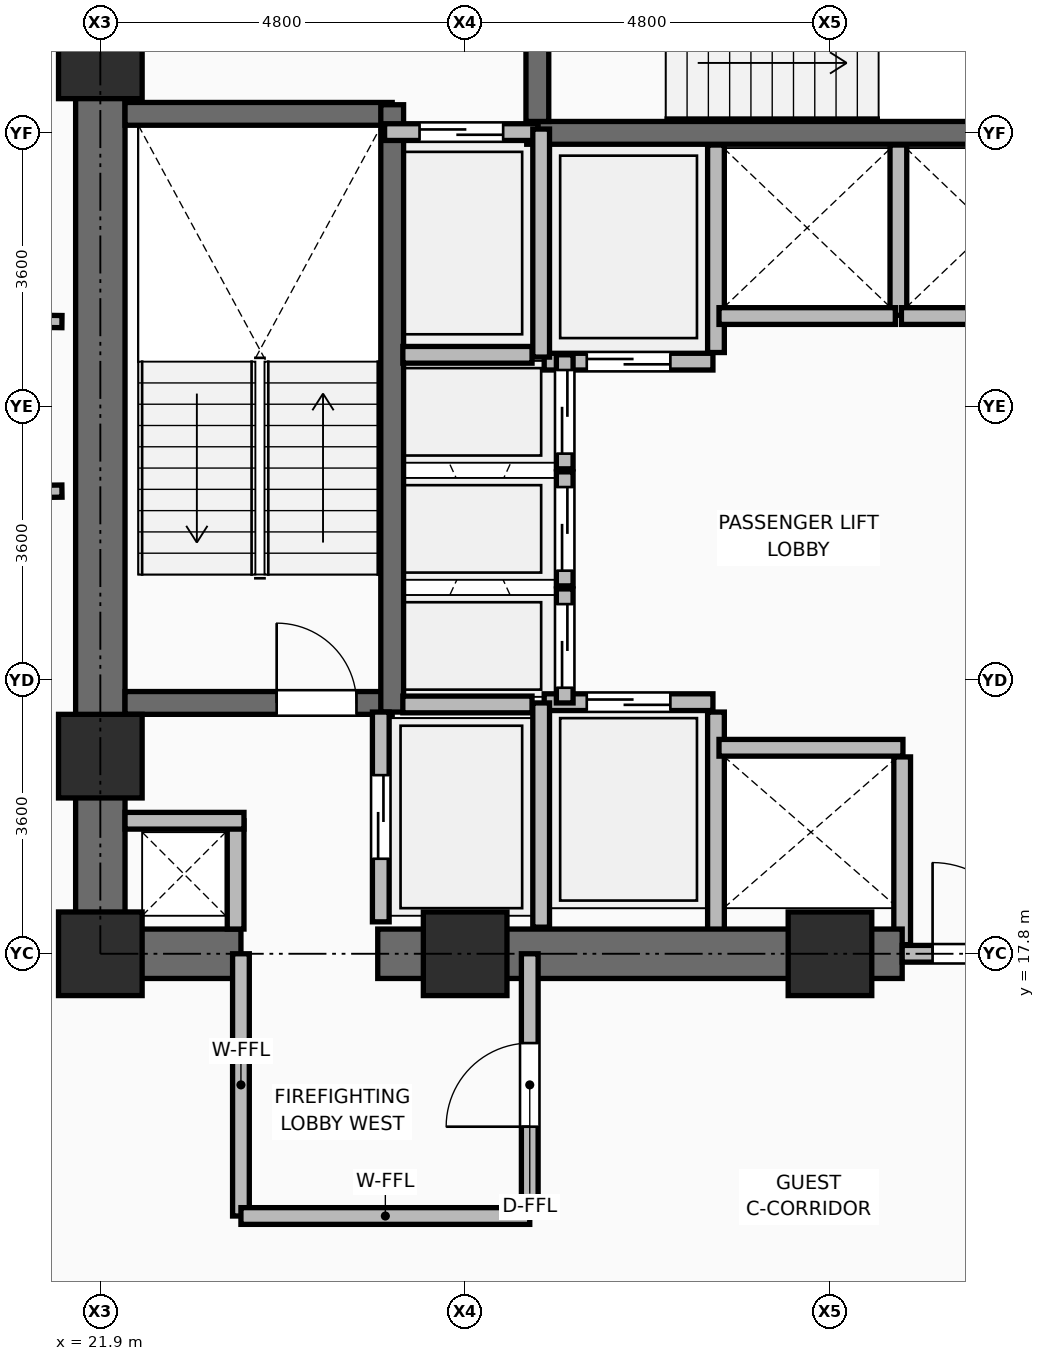
"""IFC4 building model, lengths in metres.
Left out: names, types, materials, properties, quantities, classifications, styles, units other than length and angle.
Written with IfcOpenShell. Run it as: python <this file> out.ifc"""

import sys

from ifc_helpers import new_model, si_unit, direction, frame, frame_2d, origin, origin_2d, place, context, subcontext, project, spatial, rectangle, extrude, element, fill, save


model = new_model("IFC4")
c1 = context("Model", 3, precision=1e-05, world=origin(), true_north=direction((0.0, 1.0)))
c2 = subcontext(c1, "Body", "Model", "MODEL_VIEW")
j1 = project(units=[si_unit("LENGTHUNIT", "METRE"), si_unit("PLANEANGLEUNIT", "RADIAN")], contexts=[c1])
p1 = place(None, origin())
s1 = spatial("IfcSite", under=j1, at=p1, CompositionType="ELEMENT")
p2 = place(p1, origin())
s2 = spatial("IfcBuilding", under=s1, at=p2, CompositionType="ELEMENT")
p3 = place(p2, frame((0.0, 0.0, 75.75)))
s3 = spatial("IfcBuildingStorey", under=s2, at=p3, CompositionType="ELEMENT", Elevation=75.75)
for number, where, z_axis, x_axis in (
    (1, (21.9, 17.8, 0.0), (0.0, 0.0, 1.0), (1.0, 0.0, 0.0)),
    (2, (26.7, 17.8, 0.0), (0.0, 0.0, 1.0), (1.0, 0.0, 0.0)),
    (3, (31.5, 17.8, 0.0), (0.0, 0.0, 1.0), (1.0, 0.0, 0.0)),
    (4, (21.9, 20.4, 0.0), (0.0, 0.0, 1.0), (1.0, 0.0, 0.0)),
    (5, (21.9, 29.6, 0.0), (0.0, 0.0, 1.0), (1.0, 0.0, 0.0)),
):
    element("IfcColumn", number, at=place(p3, frame(where, z_axis=z_axis, x_axis=x_axis)), inside=s3, PredefinedType="COLUMN", context=c2, shape_type="SweptSolid", body=[
        extrude(rectangle(XDim=1.1, YDim=1.1, at=origin_2d()), origin(), (0.0, 0.0, 1.0), 3.75),
    ])
p4 = place(p3, frame((30.0, 18.08, 0.0), z_axis=(0.0, 0.0, 1.0), x_axis=(0.0, 1.0, 0.0)))
e6 = element("IfcWall", 6, at=p4, inside=s3, PredefinedType="PARTITIONING", context=c2, shape_type="SweptSolid", body=[
    extrude(rectangle(XDim=2.9, YDim=0.22, at=frame_2d((1.45, 0.0))), origin(), (0.0, 0.0, 1.0), 3.545),
])
p5 = place(p3, frame((32.45, 17.92, 0.0), z_axis=(0.0, 0.0, 1.0), x_axis=(0.0, 1.0, 0.0)))
e7 = element("IfcWall", 7, at=p5, inside=s3, PredefinedType="PARTITIONING", context=c2, shape_type="SweptSolid", body=[
    extrude(rectangle(XDim=2.47, YDim=0.22, at=frame_2d((1.235, 0.0))), origin(), (0.0, 0.0, 1.0), 2.928),
])
p6 = place(p3, frame((30.0, 25.71, 0.0), z_axis=(0.0, 0.0, 1.0), x_axis=(0.0, 1.0, 0.0)))
e8 = element("IfcWall", 8, at=p6, inside=s3, PredefinedType="PARTITIONING", context=c2, shape_type="SweptSolid", body=[
    extrude(rectangle(XDim=2.73, YDim=0.22, at=frame_2d((1.365, 0.0))), origin(), (0.0, 0.0, 1.0), 3.545),
])
p7 = place(p3, frame((32.4, 26.2, 0.0), z_axis=(0.0, 0.0, 1.0), x_axis=(0.0, 1.0, 0.0)))
e9 = element("IfcWall", 9, at=p7, inside=s3, PredefinedType="PARTITIONING", context=c2, shape_type="SweptSolid", body=[
    extrude(rectangle(XDim=2.24, YDim=0.22, at=frame_2d((1.12, 0.0))), origin(), (0.0, 0.0, 1.0), 3.545),
])
p8 = place(p3, frame((21.575, 17.8, 0.0), z_axis=(0.0, 0.0, 1.0), x_axis=(1.0, 0.0, 0.0)))
e10 = element("IfcWall", 10, at=p8, inside=s3, PredefinedType="SHEAR", context=c2, shape_type="SweptSolid", body=[
    extrude(rectangle(XDim=2.175, YDim=0.65, at=frame_2d((1.087, 0.0))), origin(), (0.0, 0.0, 1.0), 3.57),
])
p9 = place(p3, frame((25.55, 17.8, 0.0), z_axis=(0.0, 0.0, 1.0), x_axis=(1.0, 0.0, 0.0)))
e11 = element("IfcWall", 11, at=p9, inside=s3, PredefinedType="SHEAR", context=c2, shape_type="SweptSolid", body=[
    extrude(rectangle(XDim=6.9, YDim=0.65, at=frame_2d((3.45, 0.0))), origin(), (0.0, 0.0, 1.0), 3.57),
])
p10 = place(p3, frame((32.45, 17.8, 0.0), z_axis=(0.0, 0.0, 1.0), x_axis=(1.0, 0.0, 0.0)))
e12 = element("IfcWall", 12, at=p10, inside=s3, PredefinedType="PARTITIONING", context=c2, shape_type="SweptSolid", body=[
    extrude(rectangle(XDim=2.5, YDim=0.22, at=frame_2d((1.25, 0.0))), origin(), (0.0, 0.0, 1.0), 2.928),
])
p11 = place(p10, frame((0.4, 0.0, 0.0)))
e13 = element("IfcOpeningElement", 13, at=p11, cuts=e12, PredefinedType="OPENING", context=c2, shape_type="SweptSolid", body=[
    extrude(rectangle(XDim=1.2, YDim=2.1, at=frame_2d((0.6, 1.05))), frame((0.0, 0.12, 0.0), z_axis=(0.0, -1.0, 0.0), x_axis=(1.0, 0.0, 0.0)), (0.0, 0.0, 1.0), 0.24),
])
p12 = place(p3, frame((21.9, 18.125, 0.0), z_axis=(0.0, 0.0, 1.0), x_axis=(0.0, 1.0, 0.0)))
e14 = element("IfcWall", 14, at=p12, inside=s3, PredefinedType="SHEAR", context=c2, shape_type="SweptSolid", body=[
    extrude(rectangle(XDim=14.0, YDim=0.65, at=frame_2d((7.0, 0.0))), origin(), (0.0, 0.0, 1.0), 3.57),
])
p13 = place(p3, frame((22.225, 21.1, 0.0), z_axis=(0.0, 0.0, 1.0), x_axis=(1.0, 0.0, 0.0)))
e15 = element("IfcWall", 15, at=p13, inside=s3, PredefinedType="SHEAR", context=c2, shape_type="SweptSolid", body=[
    extrude(rectangle(XDim=3.515, YDim=0.3, at=frame_2d((1.757, 0.0))), origin(), (0.0, 0.0, 1.0), 3.57),
])
p14 = place(p13, frame((1.995, 0.0, 0.0)))
e16 = element("IfcOpeningElement", 16, at=p14, cuts=e15, PredefinedType="OPENING", context=c2, shape_type="SweptSolid", body=[
    extrude(rectangle(XDim=1.05, YDim=2.1, at=frame_2d((0.525, 1.05))), frame((0.0, 0.16, 0.0), z_axis=(0.0, -1.0, 0.0), x_axis=(1.0, 0.0, 0.0)), (0.0, 0.0, 1.0), 0.32),
])
p15 = place(p3, frame((22.225, 28.85, 0.0), z_axis=(0.0, 0.0, 1.0), x_axis=(1.0, 0.0, 0.0)))
e17 = element("IfcWall", 17, at=p15, inside=s3, PredefinedType="SHEAR", context=c2, shape_type="SweptSolid", body=[
    extrude(rectangle(XDim=3.515, YDim=0.3, at=frame_2d((1.757, 0.0))), origin(), (0.0, 0.0, 1.0), 3.57),
])
p16 = place(p3, frame((25.74, 20.98, 0.0), z_axis=(0.0, 0.0, 1.0), x_axis=(0.0, 1.0, 0.0)))
e18 = element("IfcWall", 18, at=p16, inside=s3, PredefinedType="SHEAR", context=c2, shape_type="SweptSolid", body=[
    extrude(rectangle(XDim=7.99, YDim=0.3, at=frame_2d((3.995, 0.0))), origin(), (0.0, 0.0, 1.0), 3.57),
])
p17 = place(p3, frame((27.51, 28.6, 0.0), z_axis=(0.0, 0.0, 1.0), x_axis=(1.0, 0.0, 0.0)))
e19 = element("IfcWall", 19, at=p17, inside=s3, PredefinedType="SHEAR", context=c2, shape_type="SweptSolid", body=[
    extrude(rectangle(XDim=8.03, YDim=0.3, at=frame_2d((4.015, 0.0))), origin(), (0.0, 0.0, 1.0), 3.57),
])
p18 = place(p3, frame((27.65, 28.75, 0.0), z_axis=(0.0, 0.0, 1.0), x_axis=(0.0, 1.0, 0.0)))
e20 = element("IfcWall", 20, at=p18, inside=s3, PredefinedType="SHEAR", context=c2, shape_type="SweptSolid", body=[
    extrude(rectangle(XDim=3.375, YDim=0.3, at=frame_2d((1.688, 0.0))), origin(), (0.0, 0.0, 1.0), 3.57),
])
p19 = place(p18, frame((1.0, 0.0, 0.0)))
e21 = element("IfcOpeningElement", 21, at=p19, cuts=e20, PredefinedType="OPENING", context=c2, shape_type="SweptSolid", body=[
    extrude(rectangle(XDim=1.05, YDim=2.1, at=frame_2d((0.525, 1.05))), frame((0.0, 0.16, 0.0), z_axis=(0.0, -1.0, 0.0), x_axis=(1.0, 0.0, 0.0)), (0.0, 0.0, 1.0), 0.32),
])
p20 = place(p3, frame((23.68, 18.125, 0.0), z_axis=(0.0, 0.0, 1.0), x_axis=(0.0, 1.0, 0.0)))
e22 = element("IfcWall", 22, at=p20, inside=s3, PredefinedType="PARTITIONING", context=c2, shape_type="SweptSolid", body=[
    extrude(rectangle(XDim=1.425, YDim=0.22, at=frame_2d((0.712, 0.0))), origin(), (0.0, 0.0, 1.0), 3.55),
])
p21 = place(p3, frame((22.225, 19.55, 0.0), z_axis=(0.0, 0.0, 1.0), x_axis=(1.0, 0.0, 0.0)))
e23 = element("IfcWall", 23, at=p21, inside=s3, PredefinedType="PARTITIONING", context=c2, shape_type="SweptSolid", body=[
    extrude(rectangle(XDim=1.565, YDim=0.22, at=frame_2d((0.782, 0.0))), origin(), (0.0, 0.0, 1.0), 2.595),
])
p22 = place(p3, frame((25.59, 18.22, 0.0), z_axis=(0.0, 0.0, 1.0), x_axis=(0.0, 1.0, 0.0)))
e24 = element("IfcWall", 24, at=p22, inside=s3, PredefinedType="PARTITIONING", context=c2, shape_type="SweptSolid", body=[
    extrude(rectangle(XDim=2.76, YDim=0.22, at=frame_2d((1.38, 0.0))), origin(), (0.0, 0.0, 1.0), 3.55),
])
p23 = place(p22, frame((0.83, 0.0, 0.0)))
e25 = element("IfcOpeningElement", 25, at=p23, cuts=e24, PredefinedType="OPENING", context=c2, shape_type="SweptSolid", body=[
    extrude(rectangle(XDim=1.1, YDim=2.2, at=frame_2d((0.55, 1.1))), frame((0.0, 0.12, 0.0), z_axis=(0.0, -1.0, 0.0), x_axis=(1.0, 0.0, 0.0)), (0.0, 0.0, 1.0), 0.24),
])
p24 = place(p3, frame((25.64, 28.61, 0.0), z_axis=(0.0, 0.0, 1.0), x_axis=(1.0, 0.0, 0.0)))
e26 = element("IfcWall", 26, at=p24, inside=s3, PredefinedType="PARTITIONING", context=c2, shape_type="SweptSolid", body=[
    extrude(rectangle(XDim=2.02, YDim=0.22, at=frame_2d((1.01, 0.0))), origin(), (0.0, 0.0, 1.0), 3.55),
])
p25 = place(p24, frame((0.46, 0.0, 0.0)))
e27 = element("IfcOpeningElement", 27, at=p25, cuts=e26, PredefinedType="OPENING", context=c2, shape_type="SweptSolid", body=[
    extrude(rectangle(XDim=1.1, YDim=2.2, at=frame_2d((0.55, 1.1))), frame((0.0, 0.12, 0.0), z_axis=(0.0, -1.0, 0.0), x_axis=(1.0, 0.0, 0.0)), (0.0, 0.0, 1.0), 0.24),
])
p26 = place(p3, frame((27.74, 21.11, 0.0), z_axis=(0.0, 0.0, 1.0), x_axis=(1.0, 0.0, 0.0)))
e28 = element("IfcWall", 28, at=p26, inside=s3, PredefinedType="PARTITIONING", context=c2, shape_type="SweptSolid", body=[
    extrude(rectangle(XDim=2.22, YDim=0.22, at=frame_2d((1.11, 0.0))), origin(), (0.0, 0.0, 1.0), 3.55),
])
p27 = place(p26, frame((0.56, 0.0, 0.0)))
e29 = element("IfcOpeningElement", 29, at=p27, cuts=e28, PredefinedType="OPENING", context=c2, shape_type="SweptSolid", body=[
    extrude(rectangle(XDim=1.1, YDim=2.2, at=frame_2d((0.55, 1.1))), frame((0.0, 0.12, 0.0), z_axis=(0.0, -1.0, 0.0), x_axis=(1.0, 0.0, 0.0)), (0.0, 0.0, 1.0), 0.24),
])
p28 = place(p3, frame((27.74, 25.59, 0.0), z_axis=(0.0, 0.0, 1.0), x_axis=(1.0, 0.0, 0.0)))
e30 = element("IfcWall", 30, at=p28, inside=s3, PredefinedType="PARTITIONING", context=c2, shape_type="SweptSolid", body=[
    extrude(rectangle(XDim=2.22, YDim=0.22, at=frame_2d((1.11, 0.0))), origin(), (0.0, 0.0, 1.0), 3.55),
])
p29 = place(p28, frame((0.56, 0.0, 0.0)))
e31 = element("IfcOpeningElement", 31, at=p29, cuts=e30, PredefinedType="OPENING", context=c2, shape_type="SweptSolid", body=[
    extrude(rectangle(XDim=1.1, YDim=2.2, at=frame_2d((0.55, 1.1))), frame((0.0, 0.12, 0.0), z_axis=(0.0, -1.0, 0.0), x_axis=(1.0, 0.0, 0.0)), (0.0, 0.0, 1.0), 0.24),
])
p30 = place(p3, frame((30.04, 20.51, 0.0), z_axis=(0.0, 0.0, 1.0), x_axis=(1.0, 0.0, 0.0)))
e32 = element("IfcWall", 32, at=p30, inside=s3, PredefinedType="PARTITIONING", context=c2, shape_type="SweptSolid", body=[
    extrude(rectangle(XDim=2.42, YDim=0.22, at=frame_2d((1.21, 0.0))), origin(), (0.0, 0.0, 1.0), 3.55),
])
for number, where, z_axis, x_axis in (
    (33, (30.04, 26.19, 0.0), (0.0, 0.0, 1.0), (1.0, 0.0, 0.0)),
    (34, (32.44, 26.19, 0.0), (0.0, 0.0, 1.0), (1.0, 0.0, 0.0)),
):
    element("IfcWall", number, at=place(p3, frame(where, z_axis=z_axis, x_axis=x_axis)), inside=s3, PredefinedType="PARTITIONING", context=c2, shape_type="SweptSolid", body=[
        extrude(rectangle(XDim=2.32, YDim=0.22, at=frame_2d((1.16, 0.0))), origin(), (0.0, 0.0, 1.0), 3.55),
    ])
p31 = place(p3, frame((28.01, 21.1, 0.0), z_axis=(0.0, 0.0, 1.0), x_axis=(0.0, 1.0, 0.0)))
e35 = element("IfcWall", 35, at=p31, inside=s3, PredefinedType="PARTITIONING", context=c2, shape_type="SweptSolid", body=[
    extrude(rectangle(XDim=1.5, YDim=0.22, at=frame_2d((0.75, 0.0))), origin(), (0.0, 0.0, 1.0), 3.55),
])
p32 = place(p31, frame((0.2, 0.0, 0.0)))
e36 = element("IfcOpeningElement", 36, at=p32, cuts=e35, PredefinedType="OPENING", context=c2, shape_type="SweptSolid", body=[
    extrude(rectangle(XDim=1.1, YDim=2.2, at=frame_2d((0.55, 1.1))), frame((0.0, 0.12, 0.0), z_axis=(0.0, -1.0, 0.0), x_axis=(1.0, 0.0, 0.0)), (0.0, 0.0, 1.0), 0.24),
])
p33 = place(p3, frame((28.01, 22.64, 0.0), z_axis=(0.0, 0.0, 1.0), x_axis=(0.0, 1.0, 0.0)))
e37 = element("IfcWall", 37, at=p33, inside=s3, PredefinedType="PARTITIONING", context=c2, shape_type="SweptSolid", body=[
    extrude(rectangle(XDim=1.5, YDim=0.22, at=frame_2d((0.75, 0.0))), origin(), (0.0, 0.0, 1.0), 3.55),
])
p34 = place(p33, frame((0.2, 0.0, 0.0)))
e38 = element("IfcOpeningElement", 38, at=p34, cuts=e37, PredefinedType="OPENING", context=c2, shape_type="SweptSolid", body=[
    extrude(rectangle(XDim=1.1, YDim=2.2, at=frame_2d((0.55, 1.1))), frame((0.0, 0.12, 0.0), z_axis=(0.0, -1.0, 0.0), x_axis=(1.0, 0.0, 0.0)), (0.0, 0.0, 1.0), 0.24),
])
p35 = place(p3, frame((28.01, 24.18, 0.0), z_axis=(0.0, 0.0, 1.0), x_axis=(0.0, 1.0, 0.0)))
e39 = element("IfcWall", 39, at=p35, inside=s3, PredefinedType="PARTITIONING", context=c2, shape_type="SweptSolid", body=[
    extrude(rectangle(XDim=1.5, YDim=0.22, at=frame_2d((0.75, 0.0))), origin(), (0.0, 0.0, 1.0), 3.55),
])
p36 = place(p35, frame((0.2, 0.0, 0.0)))
e40 = element("IfcOpeningElement", 40, at=p36, cuts=e39, PredefinedType="OPENING", context=c2, shape_type="SweptSolid", body=[
    extrude(rectangle(XDim=1.1, YDim=2.2, at=frame_2d((0.55, 1.1))), frame((0.0, 0.12, 0.0), z_axis=(0.0, -1.0, 0.0), x_axis=(1.0, 0.0, 0.0)), (0.0, 0.0, 1.0), 0.24),
])
p37 = place(p3, frame((27.7, 18.15, 0.0), z_axis=(0.0, 0.0, 1.0), x_axis=(0.0, 1.0, 0.0)))
e41 = element("IfcWall", 41, at=p37, inside=s3, PredefinedType="PARTITIONING", context=c2, shape_type="SweptSolid", body=[
    extrude(rectangle(XDim=2.95, YDim=0.22, at=frame_2d((1.475, 0.0))), origin(), (0.0, 0.0, 1.0), 3.55),
])
p38 = place(p3, frame((27.7, 25.65, 0.0), z_axis=(0.0, 0.0, 1.0), x_axis=(0.0, 1.0, 0.0)))
e42 = element("IfcWall", 42, at=p38, inside=s3, PredefinedType="PARTITIONING", context=c2, shape_type="SweptSolid", body=[
    extrude(rectangle(XDim=3.0, YDim=0.22, at=frame_2d((1.5, 0.0))), origin(), (0.0, 0.0, 1.0), 3.55),
])
for number, where, z_axis, x_axis in (
    (43, (25.88, 21.08, 0.0), (0.0, 0.0, 1.0), (1.0, 0.0, 0.0)),
    (44, (25.88, 25.68, 0.0), (0.0, 0.0, 1.0), (1.0, 0.0, 0.0)),
):
    element("IfcWall", number, at=place(p3, frame(where, z_axis=z_axis, x_axis=x_axis)), inside=s3, PredefinedType="PARTITIONING", context=c2, shape_type="SweptSolid", body=[
        extrude(rectangle(XDim=1.7, YDim=0.22, at=frame_2d((0.85, 0.0))), origin(), (0.0, 0.0, 1.0), 3.55),
    ])
p39 = place(p3, frame((23.75, 14.35, 0.0), z_axis=(0.0, 0.0, 1.0), x_axis=(0.0, 1.0, 0.0)))
e45 = element("IfcWall", 45, at=p39, inside=s3, PredefinedType="PARTITIONING", context=c2, shape_type="SweptSolid", body=[
    extrude(rectangle(XDim=3.45, YDim=0.22, at=frame_2d((1.725, 0.0))), origin(), (0.0, 0.0, 1.0), 2.928),
])
p40 = place(p3, frame((23.75, 14.35, 0.0), z_axis=(0.0, 0.0, 1.0), x_axis=(1.0, 0.0, 0.0)))
e46 = element("IfcWall", 46, at=p40, inside=s3, PredefinedType="PARTITIONING", context=c2, shape_type="SweptSolid", body=[
    extrude(rectangle(XDim=3.8, YDim=0.22, at=frame_2d((1.9, 0.0))), origin(), (0.0, 0.0, 1.0), 3.55),
])
p41 = place(p3, frame((27.55, 14.35, 0.0), z_axis=(0.0, 0.0, 1.0), x_axis=(0.0, 1.0, 0.0)))
e47 = element("IfcWall", 47, at=p41, inside=s3, PredefinedType="PARTITIONING", context=c2, shape_type="SweptSolid", body=[
    extrude(rectangle(XDim=3.45, YDim=0.22, at=frame_2d((1.725, 0.0))), origin(), (0.0, 0.0, 1.0), 2.928),
])
p42 = place(p41, frame((1.175, 0.0, 0.0)))
e48 = element("IfcOpeningElement", 48, at=p42, cuts=e47, PredefinedType="OPENING", context=c2, shape_type="SweptSolid", body=[
    extrude(rectangle(XDim=1.1, YDim=2.1, at=frame_2d((0.55, 1.05))), frame((0.0, 0.12, 0.0), z_axis=(0.0, -1.0, 0.0), x_axis=(1.0, 0.0, 0.0)), (0.0, 0.0, 1.0), 0.24),
])
p43 = place(p3, frame((21.395, 26.117, 0.0), z_axis=(0.0, 0.0, 1.0), x_axis=(-0.999934504226, 0.011444966545, 0.0)))
e49 = element("IfcWall", 49, at=p43, inside=s3, PredefinedType="PARTITIONING", context=c2, shape_type="SweptSolid", body=[
    extrude(rectangle(XDim=2.197, YDim=0.16, at=frame_2d((1.099, 0.0))), origin(), (0.0, 0.0, 1.0), 3.55),
])
p44 = place(p3, frame((19.198, 23.858, 0.0), z_axis=(0.0, 0.0, 1.0), x_axis=(0.999912578456, 0.013222535486, 0.0)))
e50 = element("IfcWall", 50, at=p44, inside=s3, PredefinedType="PARTITIONING", context=c2, shape_type="SweptSolid", body=[
    extrude(rectangle(XDim=2.197, YDim=0.16, at=frame_2d((1.099, 0.0))), origin(), (0.0, 0.0, 1.0), 3.55),
])
p45 = place(p44, frame((0.837, 0.0, 0.0)))
e51 = element("IfcOpeningElement", 51, at=p45, cuts=e50, PredefinedType="OPENING", context=c2, shape_type="SweptSolid", body=[
    extrude(rectangle(XDim=1.2, YDim=2.1, at=frame_2d((0.6, 1.05))), frame((0.0, 0.09, 0.0), z_axis=(0.0, -1.0, 0.0), x_axis=(1.0, 0.0, 0.0)), (0.0, 0.0, 1.0), 0.18),
])
p46 = place(p11, origin())
e52 = element("IfcDoor", 52, at=p46, inside=s3, OperationType="SINGLE_SWING_LEFT", PredefinedType="DOOR", context=c2, shape_type="SweptSolid", body=[
    extrude(rectangle(XDim=1.2, YDim=2.1, at=frame_2d((0.6, 1.05))), frame((0.0, 0.025, 0.0), z_axis=(0.0, -1.0, 0.0), x_axis=(1.0, 0.0, 0.0)), (0.0, 0.0, 1.0), 0.05),
])
fill(e13, e52)
p47 = place(p14, origin())
e53 = element("IfcDoor", 53, at=p47, inside=s3, OperationType="SINGLE_SWING_LEFT", PredefinedType="DOOR", context=c2, shape_type="SweptSolid", body=[
    extrude(rectangle(XDim=1.05, YDim=2.1, at=frame_2d((0.525, 1.05))), frame((0.0, 0.025, 0.0), z_axis=(0.0, -1.0, 0.0), x_axis=(1.0, 0.0, 0.0)), (0.0, 0.0, 1.0), 0.05),
])
fill(e16, e53)
p48 = place(p23, origin())
e54 = element("IfcDoor", 54, at=p48, inside=s3, OperationType="DOUBLE_DOOR_SLIDING", PredefinedType="DOOR", context=c2, shape_type="SweptSolid", body=[
    extrude(rectangle(XDim=1.1, YDim=2.2, at=frame_2d((0.55, 1.1))), frame((0.0, 0.025, 0.0), z_axis=(0.0, -1.0, 0.0), x_axis=(1.0, 0.0, 0.0)), (0.0, 0.0, 1.0), 0.05),
])
fill(e25, e54)
p49 = place(p25, origin())
e55 = element("IfcDoor", 55, at=p49, inside=s3, OperationType="DOUBLE_DOOR_SLIDING", PredefinedType="DOOR", context=c2, shape_type="SweptSolid", body=[
    extrude(rectangle(XDim=1.1, YDim=2.2, at=frame_2d((0.55, 1.1))), frame((0.0, 0.025, 0.0), z_axis=(0.0, -1.0, 0.0), x_axis=(1.0, 0.0, 0.0)), (0.0, 0.0, 1.0), 0.05),
])
fill(e27, e55)
p50 = place(p27, origin())
e56 = element("IfcDoor", 56, at=p50, inside=s3, OperationType="DOUBLE_DOOR_SLIDING", PredefinedType="DOOR", context=c2, shape_type="SweptSolid", body=[
    extrude(rectangle(XDim=1.1, YDim=2.2, at=frame_2d((0.55, 1.1))), frame((0.0, 0.025, 0.0), z_axis=(0.0, -1.0, 0.0), x_axis=(1.0, 0.0, 0.0)), (0.0, 0.0, 1.0), 0.05),
])
fill(e29, e56)
p51 = place(p29, frame((1.1, 0.0, 0.0), z_axis=(0.0, 0.0, 1.0), x_axis=(-1.0, 0.0, 0.0)))
e57 = element("IfcDoor", 57, at=p51, inside=s3, OperationType="DOUBLE_DOOR_SLIDING", PredefinedType="DOOR", context=c2, shape_type="SweptSolid", body=[
    extrude(rectangle(XDim=1.1, YDim=2.2, at=frame_2d((0.55, 1.1))), frame((0.0, 0.025, 0.0), z_axis=(0.0, -1.0, 0.0), x_axis=(1.0, 0.0, 0.0)), (0.0, 0.0, 1.0), 0.05),
])
fill(e31, e57)
p52 = place(p32, frame((1.1, 0.0, 0.0), z_axis=(0.0, 0.0, 1.0), x_axis=(-1.0, 0.0, 0.0)))
e58 = element("IfcDoor", 58, at=p52, inside=s3, OperationType="DOUBLE_DOOR_SLIDING", PredefinedType="DOOR", context=c2, shape_type="SweptSolid", body=[
    extrude(rectangle(XDim=1.1, YDim=2.2, at=frame_2d((0.55, 1.1))), frame((0.0, 0.025, 0.0), z_axis=(0.0, -1.0, 0.0), x_axis=(1.0, 0.0, 0.0)), (0.0, 0.0, 1.0), 0.05),
])
fill(e36, e58)
p53 = place(p34, frame((1.1, 0.0, 0.0), z_axis=(0.0, 0.0, 1.0), x_axis=(-1.0, 0.0, 0.0)))
e59 = element("IfcDoor", 59, at=p53, inside=s3, OperationType="DOUBLE_DOOR_SLIDING", PredefinedType="DOOR", context=c2, shape_type="SweptSolid", body=[
    extrude(rectangle(XDim=1.1, YDim=2.2, at=frame_2d((0.55, 1.1))), frame((0.0, 0.025, 0.0), z_axis=(0.0, -1.0, 0.0), x_axis=(1.0, 0.0, 0.0)), (0.0, 0.0, 1.0), 0.05),
])
fill(e38, e59)
p54 = place(p36, frame((1.1, 0.0, 0.0), z_axis=(0.0, 0.0, 1.0), x_axis=(-1.0, 0.0, 0.0)))
e60 = element("IfcDoor", 60, at=p54, inside=s3, OperationType="DOUBLE_DOOR_SLIDING", PredefinedType="DOOR", context=c2, shape_type="SweptSolid", body=[
    extrude(rectangle(XDim=1.1, YDim=2.2, at=frame_2d((0.55, 1.1))), frame((0.0, 0.025, 0.0), z_axis=(0.0, -1.0, 0.0), x_axis=(1.0, 0.0, 0.0)), (0.0, 0.0, 1.0), 0.05),
])
fill(e40, e60)
p55 = place(p42, origin())
e61 = element("IfcDoor", 61, at=p55, inside=s3, OperationType="SINGLE_SWING_LEFT", PredefinedType="DOOR", context=c2, shape_type="SweptSolid", body=[
    extrude(rectangle(XDim=1.1, YDim=2.1, at=frame_2d((0.55, 1.05))), frame((0.0, 0.025, 0.0), z_axis=(0.0, -1.0, 0.0), x_axis=(1.0, 0.0, 0.0)), (0.0, 0.0, 1.0), 0.05),
])
fill(e48, e61)
save(model, sys.argv[1])
